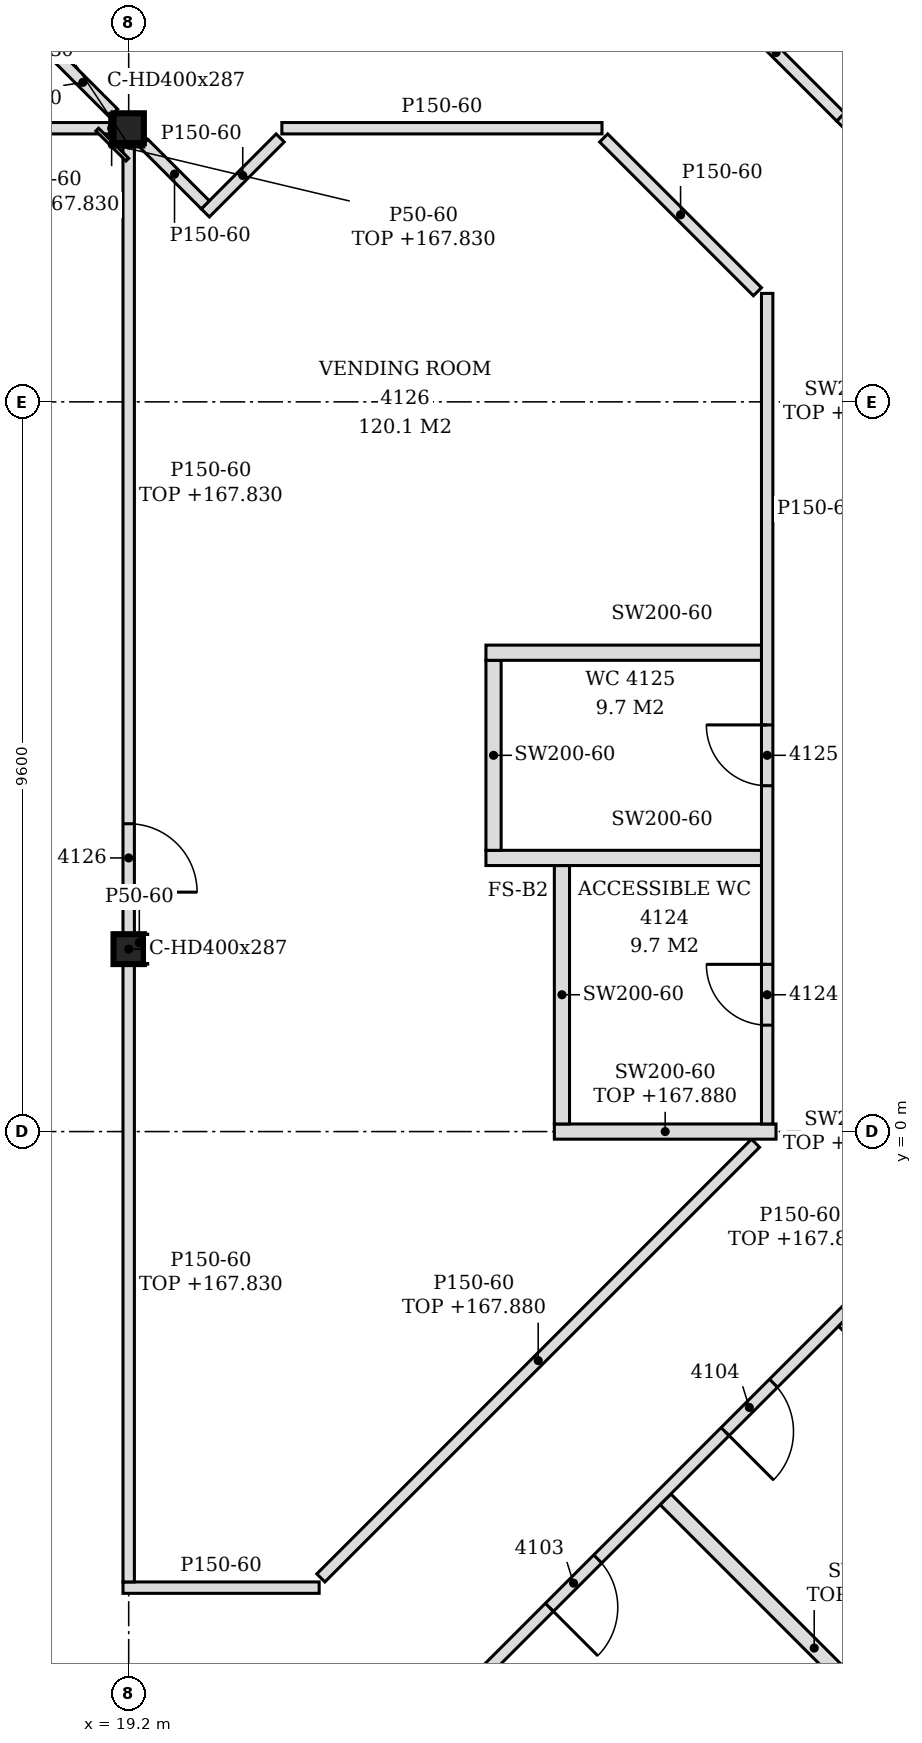
"""IFC4 building model, lengths in metres.
Left out: names, types, materials, properties, quantities, classifications, styles, units other than length and angle.
Written with IfcOpenShell. Run it as: python <this file> out.ifc"""

import sys

from ifc_helpers import new_model, si_unit, direction, frame, frame_2d, origin, origin_2d, place, context, subcontext, project, spatial, polyline, rectangle, i_section, outline, extrude, element, fill, save


model = new_model("IFC4")
c1 = context("Model", 3, precision=1e-05, world=origin(), true_north=direction((0.0, 1.0)))
c2 = subcontext(c1, "Body", "Model", "MODEL_VIEW")
j1 = project(units=[si_unit("LENGTHUNIT", "METRE"), si_unit("PLANEANGLEUNIT", "RADIAN")], contexts=[c1])
p1 = place(None, origin())
s1 = spatial("IfcSite", under=j1, at=p1, CompositionType="ELEMENT")
p2 = place(p1, origin())
s2 = spatial("IfcBuilding", under=s1, at=p2, CompositionType="ELEMENT")
p3 = place(p2, frame((0.0, 0.0, 165.0)))
s3 = spatial("IfcBuildingStorey", under=s2, at=p3, CompositionType="ELEMENT", Elevation=165.0)
for number, where, z_axis, x_axis in (
    (1, (19.2, 2.4, -0.15), (0.0, 0.0, 1.0), (1.0, 0.0, 0.0)),
    (2, (19.2, 13.2, -0.15), (0.0, 0.0, 1.0), (1.0, 0.0, 0.0)),
):
    element("IfcColumn", number, at=place(p3, frame(where, z_axis=z_axis, x_axis=x_axis)), inside=s3, PredefinedType="COLUMN", context=c2, shape_type="SweptSolid", body=[
        extrude(i_section(OverallWidth=0.399, OverallDepth=0.393, WebThickness=0.023, FlangeThickness=0.037, FilletRadius=0.015, at=origin_2d()), origin(), (0.0, 0.0, 1.0), 3.6),
    ])
p4 = place(p3, frame((30.176, -8.752, 0.0), z_axis=(0.0, 0.0, 1.0), x_axis=(-0.707084725798, 0.707128835887, 0.0)))
e3 = element("IfcWall", 3, at=p4, inside=s3, PredefinedType="PARTITIONING", context=c2, shape_type="SweptSolid", body=[
    extrude(rectangle(XDim=5.535, YDim=0.2, at=frame_2d((2.768, 0.0))), origin(), (0.0, 0.0, 1.0), 2.88),
])
p5 = place(p3, frame((22.722, -8.272, 0.0), z_axis=(0.0, 0.0, 1.0), x_axis=(0.707106781187, 0.707106781187, 0.0)))
e4 = element("IfcWall", 4, at=p5, inside=s3, PredefinedType="PARTITIONING", context=c2, shape_type="SweptSolid", body=[
    extrude(rectangle(XDim=10.399, YDim=0.15, at=frame_2d((5.199, 0.0))), origin(), (0.0, 0.0, 1.0), 2.88),
])
p6 = place(p5, frame((2.846, 0.0, 0.0)))
e5 = element("IfcOpeningElement", 5, at=p6, cuts=e4, PredefinedType="OPENING", context=c2, shape_type="SweptSolid", body=[
    extrude(rectangle(XDim=0.9, YDim=2.1, at=frame_2d((0.45, 1.05))), frame((0.0, 0.085, 0.0), z_axis=(0.0, -1.0, 0.0), x_axis=(1.0, 0.0, 0.0)), (0.0, 0.0, 1.0), 0.17),
])
p7 = place(p5, frame((6.116, 0.0, 0.0)))
e6 = element("IfcOpeningElement", 6, at=p7, cuts=e4, PredefinedType="OPENING", context=c2, shape_type="SweptSolid", body=[
    extrude(rectangle(XDim=0.9, YDim=2.1, at=frame_2d((0.45, 1.05))), frame((0.0, 0.085, 0.0), z_axis=(0.0, -1.0, 0.0), x_axis=(1.0, 0.0, 0.0)), (0.0, 0.0, 1.0), 0.17),
])
p8 = place(p3, frame((33.155, -7.107, 0.0), z_axis=(0.0, 0.0, 1.0), x_axis=(-0.70708794033, 0.707125621541, 0.0)))
e7 = element("IfcWall", 7, at=p8, inside=s3, PredefinedType="PARTITIONING", context=c2, shape_type="SweptSolid", body=[
    extrude(rectangle(XDim=6.479, YDim=0.1, at=frame_2d((3.24, 0.0))), origin(), (0.0, 0.0, 1.0), 2.88),
])
p9 = place(p8, frame((2.637, 0.0, 0.0)))
e8 = element("IfcOpeningElement", 8, at=p9, cuts=e7, PredefinedType="OPENING", context=c2, shape_type="SweptSolid", body=[
    extrude(rectangle(XDim=0.9, YDim=2.1, at=frame_2d((0.45, 1.05))), frame((0.0, 0.06, 0.0), z_axis=(0.0, -1.0, 0.0), x_axis=(1.0, 0.0, 0.0)), (0.0, 0.0, 1.0), 0.12),
])
p10 = place(p3, frame((19.125, -6.0, 0.0), z_axis=(0.0, 0.0, 1.0), x_axis=(1.0, 0.0, 0.0)))
e9 = element("IfcWall", 9, at=p10, inside=s3, PredefinedType="PARTITIONING", context=c2, shape_type="SweptSolid", body=[
    extrude(outline(polyline([(0.0, 0.0), (2.581, 0.0), (2.581, 3.45), (0.225, 3.45), (0.223, 2.83), (0.0, 2.83), (0.0, 0.0)])), frame((0.0, 0.075, 0.0), z_axis=(0.0, -1.0, 0.0), x_axis=(1.0, 0.0, 0.0)), (0.0, 0.0, 1.0), 0.15),
])
p11 = place(p3, frame((19.2, -5.925, 0.0), z_axis=(0.0, 0.0, 1.0), x_axis=(0.0, 1.0, 0.0)))
e10 = element("IfcWall", 10, at=p11, inside=s3, PredefinedType="PARTITIONING", context=c2, shape_type="SweptSolid", body=[
    extrude(rectangle(XDim=8.129, YDim=0.15, at=frame_2d((4.064, 0.0))), origin(), (0.0, 0.0, 1.0), 2.83),
])
p12 = place(p3, frame((21.728, -5.872, 0.0), z_axis=(0.0, 0.0, 1.0), x_axis=(0.707106781187, 0.707106781187, 0.0)))
e11 = element("IfcWall", 11, at=p12, inside=s3, PredefinedType="PARTITIONING", context=c2, shape_type="SweptSolid", body=[
    extrude(rectangle(XDim=8.088, YDim=0.15, at=frame_2d((4.044, 0.0))), origin(), (0.0, 0.0, 1.0), 2.88),
])
p13 = place(p3, frame((24.8, 0.0, 0.0), z_axis=(0.0, 0.0, 1.0), x_axis=(1.0, 0.0, 0.0)))
e12 = element("IfcWall", 12, at=p13, inside=s3, PredefinedType="PARTITIONING", context=c2, shape_type="SweptSolid", body=[
    extrude(rectangle(XDim=2.916, YDim=0.2, at=frame_2d((1.458, 0.0))), origin(), (0.0, 0.0, 1.0), 2.88),
])
p14 = place(p3, frame((24.9, 0.1, 0.0), z_axis=(0.0, 0.0, 1.0), x_axis=(0.0, 1.0, 0.0)))
e13 = element("IfcWall", 13, at=p14, inside=s3, PredefinedType="PARTITIONING", context=c2, shape_type="SweptSolid", body=[
    extrude(outline(polyline([(0.0, 0.0), (3.4, 0.0), (3.4, 3.45), (0.005, 3.45), (0.003, 2.88), (0.0, 2.88), (0.0, 0.0)])), frame((0.0, 0.1, 0.0), z_axis=(0.0, -1.0, 0.0), x_axis=(1.0, 0.0, 0.0)), (0.0, 0.0, 1.0), 0.2),
])
p15 = place(p3, frame((27.6, 0.1, 0.0), z_axis=(0.0, 0.0, 1.0), x_axis=(0.0, 1.0, 0.0)))
e14 = element("IfcWall", 14, at=p15, inside=s3, PredefinedType="PARTITIONING", context=c2, shape_type="SweptSolid", body=[
    extrude(outline(polyline([(0.0, 0.0), (10.927, 0.0), (10.927, 3.45), (9.605, 3.45), (9.603, 2.88), (9.395, 2.88), (9.393, 3.45), (4.805, 3.45), (4.803, 2.88), (4.595, 2.88), (4.593, 3.45), (0.005, 3.45), (0.003, 2.88), (0.0, 2.88), (0.0, 0.0)])), frame((0.0, 0.075, 0.0), z_axis=(0.0, -1.0, 0.0), x_axis=(1.0, 0.0, 0.0)), (0.0, 0.0, 1.0), 0.15),
])
p16 = place(p15, frame((1.3, 0.0, 0.0)))
e15 = element("IfcOpeningElement", 15, at=p16, cuts=e14, PredefinedType="OPENING", context=c2, shape_type="SweptSolid", body=[
    extrude(rectangle(XDim=0.8, YDim=2.1, at=frame_2d((0.4, 1.05))), frame((0.0, 0.085, 0.0), z_axis=(0.0, -1.0, 0.0), x_axis=(1.0, 0.0, 0.0)), (0.0, 0.0, 1.0), 0.17),
])
p17 = place(p15, frame((4.45, 0.0, 0.0)))
e16 = element("IfcOpeningElement", 16, at=p17, cuts=e14, PredefinedType="OPENING", context=c2, shape_type="SweptSolid", body=[
    extrude(rectangle(XDim=0.8, YDim=2.1, at=frame_2d((0.4, 1.05))), frame((0.0, 0.085, 0.0), z_axis=(0.0, -1.0, 0.0), x_axis=(1.0, 0.0, 0.0)), (0.0, 0.0, 1.0), 0.17),
])
p18 = place(p3, frame((19.2, 2.596, 0.0), z_axis=(0.0, 0.0, 1.0), x_axis=(0.0, 1.0, 0.0)))
e17 = element("IfcWall", 17, at=p18, inside=s3, PredefinedType="PARTITIONING", context=c2, shape_type="SweptSolid", body=[
    extrude(rectangle(XDim=10.407, YDim=0.15, at=frame_2d((5.204, 0.0))), origin(), (0.0, 0.0, 1.0), 2.83),
])
p19 = place(p18, frame((0.553, 0.0, 0.0)))
e18 = element("IfcOpeningElement", 18, at=p19, cuts=e17, PredefinedType="OPENING", context=c2, shape_type="SweptSolid", body=[
    extrude(rectangle(XDim=0.9, YDim=2.1, at=frame_2d((0.45, 1.05))), frame((0.0, 0.085, 0.0), z_axis=(0.0, -1.0, 0.0), x_axis=(1.0, 0.0, 0.0)), (0.0, 0.0, 1.0), 0.17),
])
p20 = place(p3, frame((23.9, 3.6, 0.0), z_axis=(0.0, 0.0, 1.0), x_axis=(1.0, 0.0, 0.0)))
e19 = element("IfcWall", 19, at=p20, inside=s3, PredefinedType="PARTITIONING", context=c2, shape_type="SweptSolid", body=[
    extrude(rectangle(XDim=3.625, YDim=0.2, at=frame_2d((1.812, 0.0))), origin(), (0.0, 0.0, 1.0), 3.45),
])
p21 = place(p3, frame((24.0, 3.7, 0.0), z_axis=(0.0, 0.0, 1.0), x_axis=(0.0, 1.0, 0.0)))
e20 = element("IfcWall", 20, at=p21, inside=s3, PredefinedType="PARTITIONING", context=c2, shape_type="SweptSolid", body=[
    extrude(outline(polyline([(0.0, 0.0), (2.5, 0.0), (2.5, 3.45), (1.205, 3.45), (1.203, 2.88), (0.995, 2.88), (0.993, 3.45), (0.0, 3.45), (0.0, 0.0)])), frame((0.0, 0.1, 0.0), z_axis=(0.0, -1.0, 0.0), x_axis=(1.0, 0.0, 0.0)), (0.0, 0.0, 1.0), 0.2),
])
p22 = place(p3, frame((23.9, 6.3, 0.0), z_axis=(0.0, 0.0, 1.0), x_axis=(1.0, 0.0, 0.0)))
e21 = element("IfcWall", 21, at=p22, inside=s3, PredefinedType="PARTITIONING", context=c2, shape_type="SweptSolid", body=[
    extrude(rectangle(XDim=3.625, YDim=0.2, at=frame_2d((1.812, 0.0))), origin(), (0.0, 0.0, 1.0), 3.45),
])
p23 = place(p3, frame((27.472, 11.049, 0.0), z_axis=(0.0, 0.0, 1.0), x_axis=(-0.707106781187, 0.707106781187, 0.0)))
e22 = element("IfcWall", 22, at=p23, inside=s3, PredefinedType="PARTITIONING", context=c2, shape_type="SweptSolid", body=[
    extrude(rectangle(XDim=2.861, YDim=0.15, at=frame_2d((1.43, 0.0))), origin(), (0.0, 0.0, 1.0), 3.45),
])
p24 = place(p3, frame((29.872, 12.043, 0.0), z_axis=(0.0, 0.0, 1.0), x_axis=(-0.707172918471, 0.707040637716, 0.0)))
e23 = element("IfcWall", 23, at=p24, inside=s3, PredefinedType="PARTITIONING", context=c2, shape_type="SweptSolid", body=[
    extrude(rectangle(XDim=1.846, YDim=0.15, at=frame_2d((0.923, 0.0))), origin(), (0.0, 0.0, 1.0), 3.45),
])
p25 = place(p3, frame((20.208, 12.086, 0.0), z_axis=(0.0, 0.0, 1.0), x_axis=(0.706756381459, 0.707457007363, 0.0)))
e24 = element("IfcWall", 24, at=p25, inside=s3, PredefinedType="PARTITIONING", context=c2, shape_type="SweptSolid", body=[
    extrude(rectangle(XDim=1.394, YDim=0.15, at=frame_2d((0.697, 0.0))), origin(), (0.0, 0.0, 1.0), 3.45),
])
p26 = place(p3, frame((20.208, 12.192, 0.0), z_axis=(0.0, 0.0, 1.0), x_axis=(-0.70721334539, 0.707000200921, 0.0)))
e25 = element("IfcWall", 25, at=p26, inside=s3, PredefinedType="PARTITIONING", context=c2, shape_type="SweptSolid", body=[
    extrude(rectangle(XDim=1.146, YDim=0.15, at=frame_2d((0.573, 0.0))), origin(), (0.0, 0.0, 1.0), 3.45),
])
p27 = place(p3, frame((7.399, 13.2, 0.0), z_axis=(0.0, 0.0, 1.0), x_axis=(1.0, 0.0, 0.0)))
e26 = element("IfcWall", 26, at=p27, inside=s3, PredefinedType="PARTITIONING", context=c2, shape_type="SweptSolid", body=[
    extrude(rectangle(XDim=11.601, YDim=0.15, at=frame_2d((5.801, 0.0))), origin(), (0.0, 0.0, 1.0), 2.83),
])
p28 = place(p27, frame((2.95, 0.0, 0.0)))
e27 = element("IfcOpeningElement", 27, at=p28, cuts=e26, PredefinedType="OPENING", context=c2, shape_type="SweptSolid", body=[
    extrude(rectangle(XDim=0.9, YDim=2.1, at=frame_2d((0.45, 1.05))), frame((0.0, 0.085, 0.0), z_axis=(0.0, -1.0, 0.0), x_axis=(1.0, 0.0, 0.0)), (0.0, 0.0, 1.0), 0.17),
])
p29 = place(p3, frame((21.215, 13.2, 0.0), z_axis=(0.0, 0.0, 1.0), x_axis=(1.0, 0.0, 0.0)))
e28 = element("IfcWall", 28, at=p29, inside=s3, PredefinedType="PARTITIONING", context=c2, shape_type="SweptSolid", body=[
    extrude(rectangle(XDim=4.212, YDim=0.15, at=frame_2d((2.106, 0.0))), origin(), (0.0, 0.0, 1.0), 3.45),
])
p30 = place(p3, frame((28.567, 13.348, 0.0), z_axis=(0.0, 0.0, 1.0), x_axis=(-0.707310148094, 0.706903355773, 0.0)))
e29 = element("IfcWall", 29, at=p30, inside=s3, PredefinedType="PARTITIONING", context=c2, shape_type="SweptSolid", body=[
    extrude(rectangle(XDim=2.401, YDim=0.15, at=frame_2d((1.2, 0.0))), origin(), (0.0, 0.0, 1.0), 2.88),
])
p31 = place(p3, frame((19.002, 13.398, 0.0), z_axis=(0.0, 0.0, 1.0), x_axis=(-0.707000200921, 0.70721334539, 0.0)))
e30 = element("IfcWall", 30, at=p31, inside=s3, PredefinedType="PARTITIONING", context=c2, shape_type="SweptSolid", body=[
    extrude(rectangle(XDim=1.146, YDim=0.15, at=frame_2d((0.573, 0.0))), origin(), (0.0, 0.0, 1.0), 3.45),
])
p32 = place(p3, frame((28.62, 13.401, 0.0), z_axis=(0.0, 0.0, 1.0), x_axis=(0.707055379538, 0.707158179099, 0.0)))
e31 = element("IfcWall", 31, at=p32, inside=s3, PredefinedType="PARTITIONING", context=c2, shape_type="SweptSolid", body=[
    extrude(rectangle(XDim=2.375, YDim=0.1, at=frame_2d((1.188, 0.0))), origin(), (0.0, 0.0, 1.0), 2.88),
])
p33 = place(p3, frame((18.086, 14.208, 0.0), z_axis=(0.0, 0.0, 1.0), x_axis=(0.70739723372, 0.706816209298, 0.0)))
e32 = element("IfcWall", 32, at=p33, inside=s3, PredefinedType="PARTITIONING", context=c2, shape_type="SweptSolid", body=[
    extrude(rectangle(XDim=1.681, YDim=0.15, at=frame_2d((0.84, 0.0))), origin(), (0.0, 0.0, 1.0), 2.73),
])
p34 = place(p3, frame((19.425, 2.204, 0.0), z_axis=(0.0, 0.0, 1.0), x_axis=(0.0, 1.0, 0.0)))
e33 = element("IfcWall", 33, at=p34, inside=s3, PredefinedType="PARTITIONING", context=c2, shape_type="SweptSolid", body=[
    extrude(rectangle(XDim=0.393, YDim=0.05, at=frame_2d((0.196, 0.0))), origin(), (0.0, 0.0, 1.0), 3.45),
])
p35 = place(p3, frame((18.976, 13.003, 0.0), z_axis=(0.0, 0.0, 1.0), x_axis=(0.0, 1.0, 0.0)))
e34 = element("IfcWall", 34, at=p35, inside=s3, PredefinedType="PARTITIONING", context=c2, shape_type="SweptSolid", body=[
    extrude(rectangle(XDim=0.393, YDim=0.05, at=frame_2d((0.197, 0.0))), origin(), (0.0, 0.0, 1.0), 2.83),
])
p36 = place(p3, frame((19.182, 12.786, 0.0), z_axis=(0.0, 0.0, 1.0), x_axis=(-0.707106781187, 0.707106781187, 0.0)))
e35 = element("IfcWall", 35, at=p36, inside=s3, PredefinedType="PARTITIONING", context=c2, shape_type="SweptSolid", body=[
    extrude(rectangle(XDim=0.56, YDim=0.05, at=frame_2d((0.28, 0.0))), origin(), (0.0, 0.0, 1.0), 2.83),
])
p37 = place(p3, frame((19.0, 12.979, 0.0), z_axis=(0.0, 0.0, 1.0), x_axis=(1.0, 0.0, 0.0)))
e36 = element("IfcWall", 36, at=p37, inside=s3, PredefinedType="PARTITIONING", context=c2, shape_type="SweptSolid", body=[
    extrude(rectangle(XDim=0.399, YDim=0.05, at=frame_2d((0.199, 0.0))), origin(), (0.0, 0.0, 1.0), 2.83),
])
p38 = place(p6, frame((0.9, 0.0, 0.0), z_axis=(0.0, 0.0, 1.0), x_axis=(-1.0, 0.0, 0.0)))
e37 = element("IfcDoor", 37, at=p38, inside=s3, OperationType="SINGLE_SWING_RIGHT", PredefinedType="DOOR", context=c2, shape_type="SweptSolid", body=[
    extrude(rectangle(XDim=0.9, YDim=2.1, at=frame_2d((0.45, 1.05))), frame((0.0, 0.025, 0.0), z_axis=(0.0, -1.0, 0.0), x_axis=(1.0, 0.0, 0.0)), (0.0, 0.0, 1.0), 0.05),
])
fill(e5, e37)
p39 = place(p7, frame((0.9, 0.0, 0.0), z_axis=(0.0, 0.0, 1.0), x_axis=(-1.0, 0.0, 0.0)))
e38 = element("IfcDoor", 38, at=p39, inside=s3, OperationType="SINGLE_SWING_RIGHT", PredefinedType="DOOR", context=c2, shape_type="SweptSolid", body=[
    extrude(rectangle(XDim=0.9, YDim=2.1, at=frame_2d((0.45, 1.05))), frame((0.0, 0.025, 0.0), z_axis=(0.0, -1.0, 0.0), x_axis=(1.0, 0.0, 0.0)), (0.0, 0.0, 1.0), 0.05),
])
fill(e6, e38)
p40 = place(p16, origin())
e39 = element("IfcDoor", 39, at=p40, inside=s3, OperationType="SINGLE_SWING_RIGHT", PredefinedType="DOOR", context=c2, shape_type="SweptSolid", body=[
    extrude(rectangle(XDim=0.8, YDim=2.1, at=frame_2d((0.4, 1.05))), frame((0.0, 0.025, 0.0), z_axis=(0.0, -1.0, 0.0), x_axis=(1.0, 0.0, 0.0)), (0.0, 0.0, 1.0), 0.05),
])
fill(e15, e39)
p41 = place(p17, origin())
e40 = element("IfcDoor", 40, at=p41, inside=s3, OperationType="SINGLE_SWING_RIGHT", PredefinedType="DOOR", context=c2, shape_type="SweptSolid", body=[
    extrude(rectangle(XDim=0.8, YDim=2.1, at=frame_2d((0.4, 1.05))), frame((0.0, 0.025, 0.0), z_axis=(0.0, -1.0, 0.0), x_axis=(1.0, 0.0, 0.0)), (0.0, 0.0, 1.0), 0.05),
])
fill(e16, e40)
p42 = place(p19, frame((0.9, 0.0, 0.0), z_axis=(0.0, 0.0, 1.0), x_axis=(-1.0, 0.0, 0.0)))
e41 = element("IfcDoor", 41, at=p42, inside=s3, OperationType="SINGLE_SWING_RIGHT", PredefinedType="DOOR", context=c2, shape_type="SweptSolid", body=[
    extrude(rectangle(XDim=0.9, YDim=2.1, at=frame_2d((0.45, 1.05))), frame((0.0, 0.025, 0.0), z_axis=(0.0, -1.0, 0.0), x_axis=(1.0, 0.0, 0.0)), (0.0, 0.0, 1.0), 0.05),
])
fill(e18, e41)
save(model, sys.argv[1])
